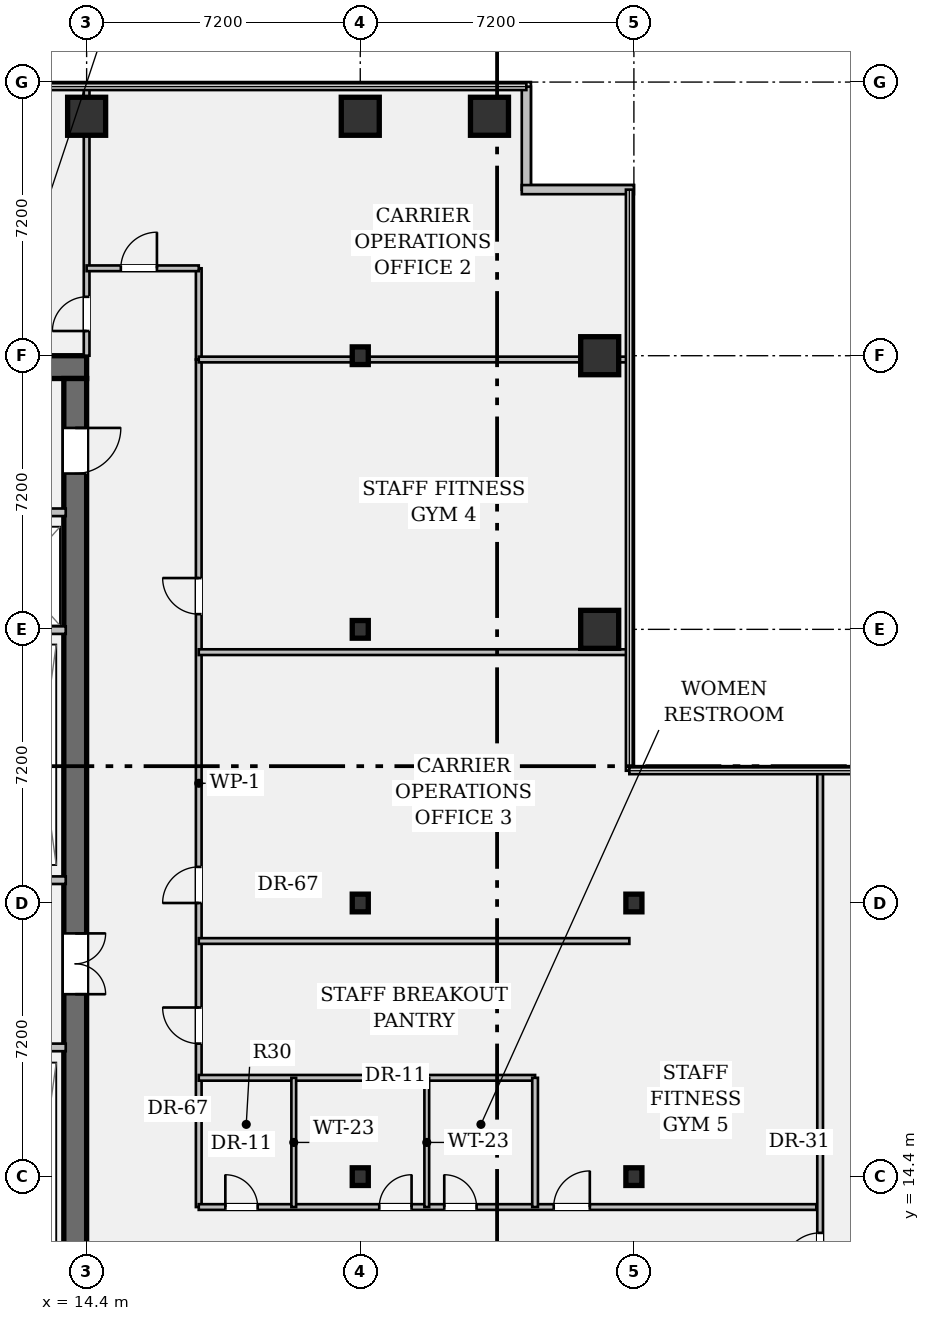
"""IFC4 building model, lengths in metres.
Left out: names, types, materials, properties, quantities, classifications, styles, units other than length and angle.
Written with IfcOpenShell. Run it as: python <this file> out.ifc"""

import sys

from ifc_helpers import new_model, si_unit, direction, frame, frame_2d, origin, origin_2d, place, context, subcontext, project, spatial, rectangle, hollow_rectangle, i_section, extrude, element, fill, save


model = new_model("IFC4")
c1 = context("Model", 3, precision=1e-05, world=origin(), true_north=direction((0.0, 1.0)))
c2 = subcontext(c1, "Body", "Model", "MODEL_VIEW")
j1 = project(units=[si_unit("LENGTHUNIT", "METRE"), si_unit("PLANEANGLEUNIT", "RADIAN")], contexts=[c1])
p1 = place(None, origin())
s1 = spatial("IfcSite", under=j1, at=p1, CompositionType="ELEMENT")
p2 = place(p1, origin())
s2 = spatial("IfcBuilding", under=s1, at=p2, CompositionType="ELEMENT")
p3 = place(p2, frame((0.0, 0.0, 61.95)))
s3 = spatial("IfcBuildingStorey", under=s2, at=p3, CompositionType="ELEMENT", Elevation=61.95)
p4 = place(p3, frame((0.6, 35.7, 0.0), z_axis=(0.0, 0.0, 1.0), x_axis=(1.0, 0.0, 0.0)))
e1 = element("IfcWall", 1, at=p4, inside=s3, PredefinedType="SHEAR", context=c2, shape_type="SweptSolid", body=[
    extrude(rectangle(XDim=13.8, YDim=0.6, at=frame_2d((6.9, 0.0))), origin(), (0.0, 0.0, 1.0), 3.57),
])
p5 = place(p3, frame((14.1, 35.4, 0.0), z_axis=(0.0, 0.0, 1.0), x_axis=(0.0, -1.0, 0.0)))
e2 = element("IfcWall", 2, at=p5, inside=s3, PredefinedType="SHEAR", context=c2, shape_type="SweptSolid", body=[
    extrude(rectangle(XDim=27.6, YDim=0.6, at=frame_2d((13.8, 0.0))), origin(), (0.0, 0.0, 1.0), 3.57),
])
p6 = place(p5, frame((1.3, 0.0, 0.0)))
e3 = element("IfcOpeningElement", 3, at=p6, cuts=e2, PredefinedType="OPENING", context=c2, shape_type="SweptSolid", body=[
    extrude(rectangle(XDim=1.2, YDim=2.15, at=frame_2d((0.6, 1.075))), frame((0.0, 0.312, 0.0), z_axis=(0.0, -1.0, 0.0), x_axis=(1.0, 0.0, 0.0)), (0.0, 0.0, 1.0), 0.624),
])
p7 = place(p5, frame((25.25, 0.0, 0.0)))
e4 = element("IfcOpeningElement", 4, at=p7, cuts=e2, PredefinedType="OPENING", context=c2, shape_type="SweptSolid", body=[
    extrude(rectangle(XDim=1.2, YDim=2.15, at=frame_2d((0.6, 1.075))), frame((0.0, 0.312, 0.0), z_axis=(0.0, -1.0, 0.0), x_axis=(1.0, 0.0, 0.0)), (0.0, 0.0, 1.0), 0.624),
])
p8 = place(p5, frame((14.6, 0.0, 0.0)))
e5 = element("IfcOpeningElement", 5, at=p8, cuts=e2, PredefinedType="OPENING", context=c2, shape_type="SweptSolid", body=[
    extrude(rectangle(XDim=1.6, YDim=2.2, at=frame_2d((0.8, 1.1))), frame((0.0, 0.312, 0.0), z_axis=(0.0, -1.0, 0.0), x_axis=(1.0, 0.0, 0.0)), (0.0, 0.0, 1.0), 0.624),
])
p9 = place(p3, frame((14.4, 42.3, 0.0), z_axis=(0.0, 0.0, 1.0), x_axis=(1.0, 0.0, 0.0)))
e6 = element("IfcColumn", 6, at=p9, inside=s3, PredefinedType="COLUMN", context=c2, shape_type="SweptSolid", body=[
    extrude(hollow_rectangle(XDim=1.0, YDim=1.0, WallThickness=0.065, at=origin_2d()), origin(), (0.0, 0.0, 1.0), 3.57),
])
for number, where, z_axis, x_axis in (
    (7, (21.6, 14.4, 0.0), (0.0, 0.0, 1.0), (1.0, 0.0, 0.0)),
    (8, (21.6, 21.6, 0.0), (0.0, 0.0, 1.0), (1.0, 0.0, 0.0)),
    (9, (21.6, 28.8, 0.0), (0.0, 0.0, 1.0), (1.0, 0.0, 0.0)),
    (10, (21.6, 36.0, 0.0), (0.0, 0.0, 1.0), (1.0, 0.0, 0.0)),
):
    element("IfcColumn", number, at=place(p3, frame(where, z_axis=z_axis, x_axis=x_axis)), inside=s3, PredefinedType="COLUMN", context=c2, shape_type="SweptSolid", body=[
        extrude(i_section(OverallWidth=0.422, OverallDepth=0.465, WebThickness=0.045, FlangeThickness=0.073, FilletRadius=0.018, at=origin_2d()), origin(), (0.0, 0.0, 1.0), 3.57),
    ])
for number, where, z_axis, x_axis in (
    (11, (21.6, 42.3, 0.0), (0.0, 0.0, 1.0), (1.0, 0.0, 0.0)),
    (12, (25.0, 42.3, 0.0), (0.0, 0.0, 1.0), (1.0, 0.0, 0.0)),
    (13, (27.9, 28.8, 0.0), (0.0, 0.0, 1.0), (1.0, 0.0, 0.0)),
    (14, (27.9, 36.0, 0.0), (0.0, 0.0, 1.0), (1.0, 0.0, 0.0)),
):
    element("IfcColumn", number, at=place(p3, frame(where, z_axis=z_axis, x_axis=x_axis)), inside=s3, PredefinedType="COLUMN", context=c2, shape_type="SweptSolid", body=[
        extrude(hollow_rectangle(XDim=1.0, YDim=1.0, WallThickness=0.065, at=origin_2d()), origin(), (0.0, 0.0, 1.0), 3.57),
    ])
for number, where, z_axis, x_axis in (
    (15, (28.8, 14.4, 0.0), (0.0, 0.0, 1.0), (1.0, 0.0, 0.0)),
    (16, (28.8, 21.6, 0.0), (0.0, 0.0, 1.0), (1.0, 0.0, 0.0)),
):
    element("IfcColumn", number, at=place(p3, frame(where, z_axis=z_axis, x_axis=x_axis)), inside=s3, PredefinedType="COLUMN", context=c2, shape_type="SweptSolid", body=[
        extrude(i_section(OverallWidth=0.422, OverallDepth=0.465, WebThickness=0.045, FlangeThickness=0.073, FilletRadius=0.018, at=origin_2d()), origin(), (0.0, 0.0, 1.0), 3.57),
    ])
p10 = place(p3, frame((25.97, 43.08, 0.0), z_axis=(0.0, 0.0, 1.0), x_axis=(0.0, -1.0, 0.0)))
e17 = element("IfcWall", 17, at=p10, inside=s3, PredefinedType="STANDARD", context=c2, shape_type="SweptSolid", body=[
    extrude(rectangle(XDim=2.71, YDim=0.24, at=frame_2d((1.355, 0.0))), origin(), (0.0, 0.0, 1.0), 3.57),
])
p11 = place(p3, frame((25.85, 40.37, 0.0), z_axis=(0.0, 0.0, 1.0), x_axis=(1.0, 0.0, 0.0)))
e18 = element("IfcWall", 18, at=p11, inside=s3, PredefinedType="STANDARD", context=c2, shape_type="SweptSolid", body=[
    extrude(rectangle(XDim=2.95, YDim=0.24, at=frame_2d((1.475, 0.0))), origin(), (0.0, 0.0, 1.0), 3.57),
])
p12 = place(p3, frame((8.7, 31.88, 0.0), z_axis=(0.0, 0.0, 1.0), x_axis=(1.0, 0.0, 0.0)))
e19 = element("IfcWall", 19, at=p12, inside=s3, PredefinedType="PARTITIONING", context=c2, shape_type="SweptSolid", body=[
    extrude(rectangle(XDim=5.15, YDim=0.2, at=frame_2d((2.575, 0.0))), origin(), (0.0, 0.0, 1.0), 3.57),
])
p13 = place(p12, frame((0.75, 0.0, 0.0)))
e20 = element("IfcOpeningElement", 20, at=p13, cuts=e19, PredefinedType="OPENING", context=c2, shape_type="SweptSolid", body=[
    extrude(rectangle(XDim=1.2, YDim=2.2, at=frame_2d((0.6, 1.1))), frame((0.0, 0.112, 0.0), z_axis=(0.0, -1.0, 0.0), x_axis=(1.0, 0.0, 0.0)), (0.0, 0.0, 1.0), 0.224),
])
p14 = place(p12, frame((3.25, 0.0, 0.0)))
e21 = element("IfcOpeningElement", 21, at=p14, cuts=e19, PredefinedType="OPENING", context=c2, shape_type="SweptSolid", body=[
    extrude(rectangle(XDim=1.2, YDim=2.2, at=frame_2d((0.6, 1.1))), frame((0.0, 0.112, 0.0), z_axis=(0.0, -1.0, 0.0), x_axis=(1.0, 0.0, 0.0)), (0.0, 0.0, 1.0), 0.224),
])
p15 = place(p3, frame((8.7, 28.78, 0.0), z_axis=(0.0, 0.0, 1.0), x_axis=(1.0, 0.0, 0.0)))
e22 = element("IfcWall", 22, at=p15, inside=s3, PredefinedType="PARTITIONING", context=c2, shape_type="SweptSolid", body=[
    extrude(rectangle(XDim=5.15, YDim=0.2, at=frame_2d((2.575, 0.0))), origin(), (0.0, 0.0, 1.0), 3.57),
])
for number, where, z_axis, x_axis in (
    (23, (7.1, 22.2, 0.0), (0.0, 0.0, 1.0), (1.0, 0.0, 0.0)),
    (24, (7.1, 17.8, 0.0), (0.0, 0.0, 1.0), (1.0, 0.0, 0.0)),
):
    element("IfcWall", number, at=place(p3, frame(where, z_axis=z_axis, x_axis=x_axis)), inside=s3, PredefinedType="PARTITIONING", context=c2, shape_type="SweptSolid", body=[
        extrude(rectangle(XDim=6.75, YDim=0.2, at=frame_2d((3.375, 0.0))), origin(), (0.0, 0.0, 1.0), 3.57),
    ])
p16 = place(p3, frame((17.35, 13.6, 0.0), z_axis=(0.0, 0.0, 1.0), x_axis=(0.0, 1.0, 0.0)))
e25 = element("IfcWall", 25, at=p16, inside=s3, PredefinedType="PARTITIONING", context=c2, shape_type="SweptSolid", body=[
    extrude(rectangle(XDim=22.3, YDim=0.15, at=frame_2d((11.15, 0.0))), origin(), (0.0, 0.0, 1.0), 2.699),
])
p17 = place(p16, frame((4.3, 0.0, 0.0)))
e26 = element("IfcOpeningElement", 26, at=p17, cuts=e25, PredefinedType="OPENING", context=c2, shape_type="SweptSolid", body=[
    extrude(rectangle(XDim=0.95, YDim=2.15, at=frame_2d((0.475, 1.075))), frame((0.0, 0.087, 0.0), z_axis=(0.0, -1.0, 0.0), x_axis=(1.0, 0.0, 0.0)), (0.0, 0.0, 1.0), 0.174),
])
p18 = place(p16, frame((8.0, 0.0, 0.0)))
e27 = element("IfcOpeningElement", 27, at=p18, cuts=e25, PredefinedType="OPENING", context=c2, shape_type="SweptSolid", body=[
    extrude(rectangle(XDim=0.95, YDim=2.15, at=frame_2d((0.475, 1.075))), frame((0.0, 0.087, 0.0), z_axis=(0.0, -1.0, 0.0), x_axis=(1.0, 0.0, 0.0)), (0.0, 0.0, 1.0), 0.174),
])
p19 = place(p16, frame((15.6, 0.0, 0.0)))
e28 = element("IfcOpeningElement", 28, at=p19, cuts=e25, PredefinedType="OPENING", context=c2, shape_type="SweptSolid", body=[
    extrude(rectangle(XDim=0.95, YDim=2.15, at=frame_2d((0.475, 1.075))), frame((0.0, 0.087, 0.0), z_axis=(0.0, -1.0, 0.0), x_axis=(1.0, 0.0, 0.0)), (0.0, 0.0, 1.0), 0.174),
])
p20 = place(p3, frame((17.35, 13.6, 0.0), z_axis=(0.0, 0.0, 1.0), x_axis=(1.0, 0.0, 0.0)))
e29 = element("IfcWall", 29, at=p20, inside=s3, PredefinedType="PARTITIONING", context=c2, shape_type="SweptSolid", body=[
    extrude(rectangle(XDim=16.25, YDim=0.15, at=frame_2d((8.125, 0.0))), origin(), (0.0, 0.0, 1.0), 2.699),
])
p21 = place(p20, frame((0.7, 0.0, 0.0)))
e30 = element("IfcOpeningElement", 30, at=p21, cuts=e29, PredefinedType="OPENING", context=c2, shape_type="SweptSolid", body=[
    extrude(rectangle(XDim=0.85, YDim=2.15, at=frame_2d((0.425, 1.075))), frame((0.0, 0.087, 0.0), z_axis=(0.0, -1.0, 0.0), x_axis=(1.0, 0.0, 0.0)), (0.0, 0.0, 1.0), 0.174),
])
p22 = place(p20, frame((4.75, 0.0, 0.0)))
e31 = element("IfcOpeningElement", 31, at=p22, cuts=e29, PredefinedType="OPENING", context=c2, shape_type="SweptSolid", body=[
    extrude(rectangle(XDim=0.85, YDim=2.15, at=frame_2d((0.425, 1.075))), frame((0.0, 0.087, 0.0), z_axis=(0.0, -1.0, 0.0), x_axis=(1.0, 0.0, 0.0)), (0.0, 0.0, 1.0), 0.174),
])
p23 = place(p20, frame((6.46, 0.0, 0.0)))
e32 = element("IfcOpeningElement", 32, at=p23, cuts=e29, PredefinedType="OPENING", context=c2, shape_type="SweptSolid", body=[
    extrude(rectangle(XDim=0.85, YDim=2.15, at=frame_2d((0.425, 1.075))), frame((0.0, 0.087, 0.0), z_axis=(0.0, -1.0, 0.0), x_axis=(1.0, 0.0, 0.0)), (0.0, 0.0, 1.0), 0.174),
])
p24 = place(p20, frame((9.34, 0.0, 0.0)))
e33 = element("IfcOpeningElement", 33, at=p24, cuts=e29, PredefinedType="OPENING", context=c2, shape_type="SweptSolid", body=[
    extrude(rectangle(XDim=0.95, YDim=2.15, at=frame_2d((0.475, 1.075))), frame((0.0, 0.087, 0.0), z_axis=(0.0, -1.0, 0.0), x_axis=(1.0, 0.0, 0.0)), (0.0, 0.0, 1.0), 0.174),
])
p25 = place(p3, frame((33.7, 0.12, 0.0), z_axis=(0.0, 0.0, 1.0), x_axis=(0.0, 1.0, 0.0)))
e34 = element("IfcWall", 34, at=p25, inside=s3, PredefinedType="PARTITIONING", context=c2, shape_type="SweptSolid", body=[
    extrude(rectangle(XDim=24.96, YDim=0.15, at=frame_2d((12.48, 0.0))), origin(), (0.0, 0.0, 1.0), 2.699),
])
p26 = place(p25, frame((11.8, 0.0, 0.0)))
e35 = element("IfcOpeningElement", 35, at=p26, cuts=e34, PredefinedType="OPENING", context=c2, shape_type="SweptSolid", body=[
    extrude(rectangle(XDim=1.0, YDim=2.15, at=frame_2d((0.5, 1.075))), frame((0.0, 0.087, 0.0), z_axis=(0.0, -1.0, 0.0), x_axis=(1.0, 0.0, 0.0)), (0.0, 0.0, 1.0), 0.174),
])
p27 = place(p3, frame((14.4, 36.0, 0.0), z_axis=(0.0, 0.0, 1.0), x_axis=(0.0, 1.0, 0.0)))
e36 = element("IfcWall", 36, at=p27, inside=s3, PredefinedType="PARTITIONING", context=c2, shape_type="SweptSolid", body=[
    extrude(rectangle(XDim=7.08, YDim=0.15, at=frame_2d((3.54, 0.0))), origin(), (0.0, 0.0, 1.0), 2.699),
])
p28 = place(p27, frame((0.65, 0.0, 0.0)))
e37 = element("IfcOpeningElement", 37, at=p28, cuts=e36, PredefinedType="OPENING", context=c2, shape_type="SweptSolid", body=[
    extrude(rectangle(XDim=0.9, YDim=2.15, at=frame_2d((0.45, 1.075))), frame((0.0, 0.087, 0.0), z_axis=(0.0, -1.0, 0.0), x_axis=(1.0, 0.0, 0.0)), (0.0, 0.0, 1.0), 0.174),
])
p29 = place(p3, frame((17.35, 35.9, 0.0), z_axis=(0.0, 0.0, 1.0), x_axis=(0.0, 1.0, 0.0)))
e38 = element("IfcWall", 38, at=p29, inside=s3, PredefinedType="PARTITIONING", context=c2, shape_type="SweptSolid", body=[
    extrude(rectangle(XDim=2.4, YDim=0.15, at=frame_2d((1.2, 0.0))), origin(), (0.0, 0.0, 1.0), 2.699),
])
p30 = place(p3, frame((14.4, 38.3, 0.0), z_axis=(0.0, 0.0, 1.0), x_axis=(1.0, 0.0, 0.0)))
e39 = element("IfcWall", 39, at=p30, inside=s3, PredefinedType="PARTITIONING", context=c2, shape_type="SweptSolid", body=[
    extrude(rectangle(XDim=2.95, YDim=0.15, at=frame_2d((1.475, 0.0))), origin(), (0.0, 0.0, 1.0), 2.699),
])
p31 = place(p30, frame((0.9, 0.0, 0.0)))
e40 = element("IfcOpeningElement", 40, at=p31, cuts=e39, PredefinedType="OPENING", context=c2, shape_type="SweptSolid", body=[
    extrude(rectangle(XDim=0.95, YDim=2.15, at=frame_2d((0.475, 1.075))), frame((0.0, 0.087, 0.0), z_axis=(0.0, -1.0, 0.0), x_axis=(1.0, 0.0, 0.0)), (0.0, 0.0, 1.0), 0.174),
])
p32 = place(p3, frame((17.35, 35.9, 0.0), z_axis=(0.0, 0.0, 1.0), x_axis=(1.0, 0.0, 0.0)))
e41 = element("IfcWall", 41, at=p32, inside=s3, PredefinedType="PARTITIONING", context=c2, shape_type="SweptSolid", body=[
    extrude(rectangle(XDim=11.33, YDim=0.15, at=frame_2d((5.665, 0.0))), origin(), (0.0, 0.0, 1.0), 2.699),
])
p33 = place(p3, frame((17.35, 17.0, 0.0), z_axis=(0.0, 0.0, 1.0), x_axis=(1.0, 0.0, 0.0)))
e42 = element("IfcWall", 42, at=p33, inside=s3, PredefinedType="PARTITIONING", context=c2, shape_type="SweptSolid", body=[
    extrude(rectangle(XDim=8.85, YDim=0.15, at=frame_2d((4.425, 0.0))), origin(), (0.0, 0.0, 1.0), 2.699),
])
p34 = place(p3, frame((26.2, 13.6, 0.0), z_axis=(0.0, 0.0, 1.0), x_axis=(0.0, 1.0, 0.0)))
e43 = element("IfcWall", 43, at=p34, inside=s3, PredefinedType="PARTITIONING", context=c2, shape_type="SweptSolid", body=[
    extrude(rectangle(XDim=3.4, YDim=0.15, at=frame_2d((1.7, 0.0))), origin(), (0.0, 0.0, 1.0), 2.699),
])
for number, where, z_axis, x_axis in (
    (44, (19.85, 13.6, 0.0), (0.0, 0.0, 1.0), (0.0, 1.0, 0.0)),
    (45, (23.35, 13.6, 0.0), (0.0, 0.0, 1.0), (0.0, 1.0, 0.0)),
):
    element("IfcWall", number, at=place(p3, frame(where, z_axis=z_axis, x_axis=x_axis)), inside=s3, PredefinedType="PARTITIONING", context=c2, shape_type="SweptSolid", body=[
        extrude(rectangle(XDim=3.4, YDim=0.125, at=frame_2d((1.7, 0.0))), origin(), (0.0, 0.0, 1.0), 2.699),
    ])
for number, where, z_axis, x_axis in (
    (46, (17.35, 20.6, 0.0), (0.0, 0.0, 1.0), (1.0, 0.0, 0.0)),
    (47, (17.35, 28.2, 0.0), (0.0, 0.0, 1.0), (1.0, 0.0, 0.0)),
):
    element("IfcWall", number, at=place(p3, frame(where, z_axis=z_axis, x_axis=x_axis)), inside=s3, PredefinedType="PARTITIONING", context=c2, shape_type="SweptSolid", body=[
        extrude(rectangle(XDim=11.33, YDim=0.15, at=frame_2d((5.665, 0.0))), origin(), (0.0, 0.0, 1.0), 2.699),
    ])
p35 = place(p6, origin())
e48 = element("IfcDoor", 48, at=p35, inside=s3, OperationType="SINGLE_SWING_LEFT", PredefinedType="DOOR", context=c2, shape_type="SweptSolid", body=[
    extrude(rectangle(XDim=1.2, YDim=2.15, at=frame_2d((0.6, 1.075))), frame((0.0, 0.025, 0.0), z_axis=(0.0, -1.0, 0.0), x_axis=(1.0, 0.0, 0.0)), (0.0, 0.0, 1.0), 0.05),
])
fill(e3, e48)
p36 = place(p8, origin())
e49 = element("IfcDoor", 49, at=p36, inside=s3, OperationType="DOUBLE_DOOR_SINGLE_SWING", PredefinedType="DOOR", context=c2, shape_type="SweptSolid", body=[
    extrude(rectangle(XDim=1.6, YDim=2.2, at=frame_2d((0.8, 1.1))), frame((0.0, 0.025, 0.0), z_axis=(0.0, -1.0, 0.0), x_axis=(1.0, 0.0, 0.0)), (0.0, 0.0, 1.0), 0.05),
])
fill(e5, e49)
p37 = place(p28, origin())
e50 = element("IfcDoor", 50, at=p37, inside=s3, OperationType="SINGLE_SWING_LEFT", PredefinedType="DOOR", context=c2, shape_type="SweptSolid", body=[
    extrude(rectangle(XDim=0.9, YDim=2.15, at=frame_2d((0.45, 1.075))), frame((0.0, 0.025, 0.0), z_axis=(0.0, -1.0, 0.0), x_axis=(1.0, 0.0, 0.0)), (0.0, 0.0, 1.0), 0.05),
])
fill(e37, e50)
p38 = place(p31, origin())
e51 = element("IfcDoor", 51, at=p38, inside=s3, OperationType="SINGLE_SWING_RIGHT", PredefinedType="DOOR", context=c2, shape_type="SweptSolid", body=[
    extrude(rectangle(XDim=0.95, YDim=2.15, at=frame_2d((0.475, 1.075))), frame((0.0, 0.025, 0.0), z_axis=(0.0, -1.0, 0.0), x_axis=(1.0, 0.0, 0.0)), (0.0, 0.0, 1.0), 0.05),
])
fill(e40, e51)
p39 = place(p21, origin())
e52 = element("IfcDoor", 52, at=p39, inside=s3, OperationType="SINGLE_SWING_LEFT", PredefinedType="DOOR", context=c2, shape_type="SweptSolid", body=[
    extrude(rectangle(XDim=0.85, YDim=2.15, at=frame_2d((0.425, 1.075))), frame((0.0, 0.025, 0.0), z_axis=(0.0, -1.0, 0.0), x_axis=(1.0, 0.0, 0.0)), (0.0, 0.0, 1.0), 0.05),
])
fill(e30, e52)
p40 = place(p22, origin())
e53 = element("IfcDoor", 53, at=p40, inside=s3, OperationType="SINGLE_SWING_RIGHT", PredefinedType="DOOR", context=c2, shape_type="SweptSolid", body=[
    extrude(rectangle(XDim=0.85, YDim=2.15, at=frame_2d((0.425, 1.075))), frame((0.0, 0.025, 0.0), z_axis=(0.0, -1.0, 0.0), x_axis=(1.0, 0.0, 0.0)), (0.0, 0.0, 1.0), 0.05),
])
fill(e31, e53)
p41 = place(p23, origin())
e54 = element("IfcDoor", 54, at=p41, inside=s3, OperationType="SINGLE_SWING_LEFT", PredefinedType="DOOR", context=c2, shape_type="SweptSolid", body=[
    extrude(rectangle(XDim=0.85, YDim=2.15, at=frame_2d((0.425, 1.075))), frame((0.0, 0.025, 0.0), z_axis=(0.0, -1.0, 0.0), x_axis=(1.0, 0.0, 0.0)), (0.0, 0.0, 1.0), 0.05),
])
fill(e32, e54)
p42 = place(p17, origin())
e55 = element("IfcDoor", 55, at=p42, inside=s3, OperationType="SINGLE_SWING_RIGHT", PredefinedType="DOOR", context=c2, shape_type="SweptSolid", body=[
    extrude(rectangle(XDim=0.95, YDim=2.15, at=frame_2d((0.475, 1.075))), frame((0.0, 0.025, 0.0), z_axis=(0.0, -1.0, 0.0), x_axis=(1.0, 0.0, 0.0)), (0.0, 0.0, 1.0), 0.05),
])
fill(e26, e55)
p43 = place(p18, origin())
e56 = element("IfcDoor", 56, at=p43, inside=s3, OperationType="SINGLE_SWING_LEFT", PredefinedType="DOOR", context=c2, shape_type="SweptSolid", body=[
    extrude(rectangle(XDim=0.95, YDim=2.15, at=frame_2d((0.475, 1.075))), frame((0.0, 0.025, 0.0), z_axis=(0.0, -1.0, 0.0), x_axis=(1.0, 0.0, 0.0)), (0.0, 0.0, 1.0), 0.05),
])
fill(e27, e56)
p44 = place(p19, origin())
e57 = element("IfcDoor", 57, at=p44, inside=s3, OperationType="SINGLE_SWING_RIGHT", PredefinedType="DOOR", context=c2, shape_type="SweptSolid", body=[
    extrude(rectangle(XDim=0.95, YDim=2.15, at=frame_2d((0.475, 1.075))), frame((0.0, 0.025, 0.0), z_axis=(0.0, -1.0, 0.0), x_axis=(1.0, 0.0, 0.0)), (0.0, 0.0, 1.0), 0.05),
])
fill(e28, e57)
p45 = place(p24, origin())
e58 = element("IfcDoor", 58, at=p45, inside=s3, OperationType="SINGLE_SWING_RIGHT", PredefinedType="DOOR", context=c2, shape_type="SweptSolid", body=[
    extrude(rectangle(XDim=0.95, YDim=2.15, at=frame_2d((0.475, 1.075))), frame((0.0, 0.025, 0.0), z_axis=(0.0, -1.0, 0.0), x_axis=(1.0, 0.0, 0.0)), (0.0, 0.0, 1.0), 0.05),
])
fill(e33, e58)
p46 = place(p26, origin())
e59 = element("IfcDoor", 59, at=p46, inside=s3, OperationType="SINGLE_SWING_LEFT", PredefinedType="DOOR", context=c2, shape_type="SweptSolid", body=[
    extrude(rectangle(XDim=1.0, YDim=2.15, at=frame_2d((0.5, 1.075))), frame((0.0, 0.025, 0.0), z_axis=(0.0, -1.0, 0.0), x_axis=(1.0, 0.0, 0.0)), (0.0, 0.0, 1.0), 0.05),
])
fill(e35, e59)
save(model, sys.argv[1])
